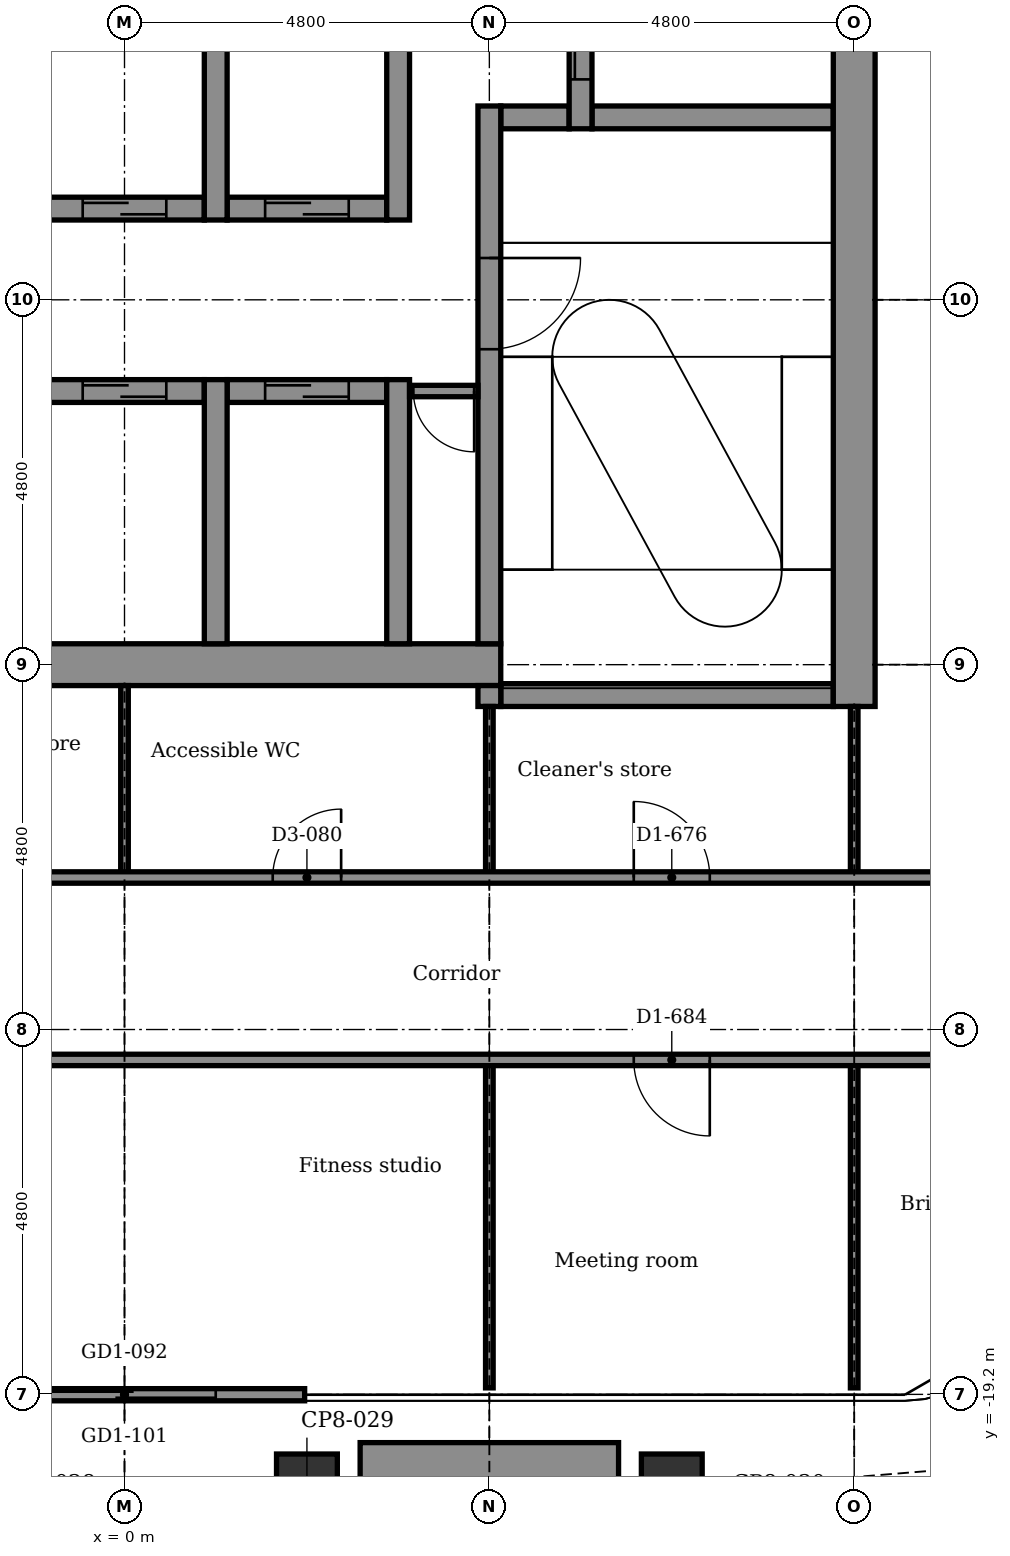
"""IFC4 building model, lengths in metres.
Left out: names, types, materials, properties, quantities, classifications, styles, units other than length and angle.
Written with IfcOpenShell. Run it as: python <this file> out.ifc"""

import sys

from ifc_helpers import new_model, si_unit, direction, frame, frame_2d, origin, origin_2d, place, context, subcontext, project, spatial, rectangle, extrude, element, fill, save


model = new_model("IFC4")
c1 = context("Model", 3, precision=1e-05, world=origin(), true_north=direction((0.0, 1.0)))
c2 = subcontext(c1, "Body", "Model", "MODEL_VIEW")
j1 = project(units=[si_unit("LENGTHUNIT", "METRE"), si_unit("PLANEANGLEUNIT", "RADIAN")], contexts=[c1])
p1 = place(None, origin())
s1 = spatial("IfcSite", under=j1, at=p1, CompositionType="ELEMENT")
p2 = place(p1, origin())
s2 = spatial("IfcBuilding", under=s1, at=p2, CompositionType="ELEMENT")
p3 = place(p2, frame((0.0, 0.0, 242.3)))
s3 = spatial("IfcBuildingStorey", under=s2, at=p3, CompositionType="ELEMENT", Elevation=242.3)
for number, where, z_axis, x_axis in (
    (1, (7.2, -20.385, -0.15), (0.0, 0.0, 1.0), (1.0, 0.0, 0.0)),
    (2, (2.4, -20.385, -0.15), (0.0, 0.0, 1.0), (1.0, 0.0, 0.0)),
):
    element("IfcColumn", number, at=place(p3, frame(where, z_axis=z_axis, x_axis=x_axis)), inside=s3, PredefinedType="COLUMN", context=c2, shape_type="SweptSolid", body=[
        extrude(rectangle(XDim=0.8, YDim=0.8, at=origin_2d()), origin(), (0.0, 0.0, 1.0), 3.9),
    ])
p4 = place(p3, frame((4.95, -10.0, -0.15), z_axis=(0.0, 0.0, 1.0), x_axis=(1.0, 0.0, 0.0)))
e3 = element("IfcWall", 3, at=p4, inside=s3, PredefinedType="STANDARD", context=c2, shape_type="SweptSolid", body=[
    extrude(rectangle(XDim=4.375, YDim=0.3, at=frame_2d((2.188, 0.0))), origin(), (0.0, 0.0, 1.0), 3.9),
])
p5 = place(p3, frame((-5.25, -9.6, -0.15), z_axis=(0.0, 0.0, 1.0), x_axis=(1.0, 0.0, 0.0)))
e4 = element("IfcWall", 4, at=p5, inside=s3, PredefinedType="SHEAR", context=c2, shape_type="SweptSolid", body=[
    extrude(rectangle(XDim=10.2, YDim=0.55, at=frame_2d((5.1, 0.0))), origin(), (0.0, 0.0, 1.0), 3.9),
])
p6 = place(p5, frame((0.6, 0.0, 0.15)))
e5 = element("IfcOpeningElement", 5, at=p6, cuts=e4, PredefinedType="OPENING", context=c2, shape_type="SweptSolid", body=[
    extrude(rectangle(XDim=0.9, YDim=2.1, at=frame_2d((0.45, 1.05))), frame((0.0, 0.285, 0.0), z_axis=(0.0, -1.0, 0.0), x_axis=(1.0, 0.0, 0.0)), (0.0, 0.0, 1.0), 0.57),
])
p7 = place(p3, frame((-1.05, -6.0, -0.15), z_axis=(0.0, 0.0, 1.0), x_axis=(1.0, 0.0, 0.0)))
e6 = element("IfcWall", 6, at=p7, inside=s3, PredefinedType="STANDARD", context=c2, shape_type="SweptSolid", body=[
    extrude(rectangle(XDim=2.1, YDim=0.3, at=frame_2d((1.05, 0.0))), origin(), (0.0, 0.0, 1.0), 3.9),
])
p8 = place(p7, frame((0.5, 0.0, 0.15)))
e7 = element("IfcOpeningElement", 7, at=p8, cuts=e6, PredefinedType="OPENING", context=c2, shape_type="SweptSolid", body=[
    extrude(rectangle(XDim=1.1, YDim=2.1, at=frame_2d((0.55, 1.05))), frame((0.0, 0.16, 0.0), z_axis=(0.0, -1.0, 0.0), x_axis=(1.0, 0.0, 0.0)), (0.0, 0.0, 1.0), 0.32),
])
p9 = place(p3, frame((1.35, -6.0, -0.15), z_axis=(0.0, 0.0, 1.0), x_axis=(1.0, 0.0, 0.0)))
e8 = element("IfcWall", 8, at=p9, inside=s3, PredefinedType="STANDARD", context=c2, shape_type="SweptSolid", body=[
    extrude(rectangle(XDim=2.1, YDim=0.3, at=frame_2d((1.05, 0.0))), origin(), (0.0, 0.0, 1.0), 3.9),
])
p10 = place(p9, frame((0.5, 0.0, 0.15)))
e9 = element("IfcOpeningElement", 9, at=p10, cuts=e8, PredefinedType="OPENING", context=c2, shape_type="SweptSolid", body=[
    extrude(rectangle(XDim=1.1, YDim=2.1, at=frame_2d((0.55, 1.05))), frame((0.0, 0.16, 0.0), z_axis=(0.0, -1.0, 0.0), x_axis=(1.0, 0.0, 0.0)), (0.0, 0.0, 1.0), 0.32),
])
p11 = place(p3, frame((-1.05, -3.6, -0.15), z_axis=(0.0, 0.0, 1.0), x_axis=(1.0, 0.0, 0.0)))
e10 = element("IfcWall", 10, at=p11, inside=s3, PredefinedType="STANDARD", context=c2, shape_type="SweptSolid", body=[
    extrude(rectangle(XDim=2.1, YDim=0.3, at=frame_2d((1.05, 0.0))), origin(), (0.0, 0.0, 1.0), 3.9),
])
p12 = place(p11, frame((0.5, 0.0, 0.15)))
e11 = element("IfcOpeningElement", 11, at=p12, cuts=e10, PredefinedType="OPENING", context=c2, shape_type="SweptSolid", body=[
    extrude(rectangle(XDim=1.1, YDim=2.1, at=frame_2d((0.55, 1.05))), frame((0.0, 0.16, 0.0), z_axis=(0.0, -1.0, 0.0), x_axis=(1.0, 0.0, 0.0)), (0.0, 0.0, 1.0), 0.32),
])
p13 = place(p3, frame((1.35, -3.6, -0.15), z_axis=(0.0, 0.0, 1.0), x_axis=(1.0, 0.0, 0.0)))
e12 = element("IfcWall", 12, at=p13, inside=s3, PredefinedType="STANDARD", context=c2, shape_type="SweptSolid", body=[
    extrude(rectangle(XDim=2.1, YDim=0.3, at=frame_2d((1.05, 0.0))), origin(), (0.0, 0.0, 1.0), 3.9),
])
p14 = place(p13, frame((0.5, 0.0, 0.15)))
e13 = element("IfcOpeningElement", 13, at=p14, cuts=e12, PredefinedType="OPENING", context=c2, shape_type="SweptSolid", body=[
    extrude(rectangle(XDim=1.1, YDim=2.1, at=frame_2d((0.55, 1.05))), frame((0.0, 0.16, 0.0), z_axis=(0.0, -1.0, 0.0), x_axis=(1.0, 0.0, 0.0)), (0.0, 0.0, 1.0), 0.32),
])
p15 = place(p3, frame((4.95, -2.4, -0.15), z_axis=(0.0, 0.0, 1.0), x_axis=(1.0, 0.0, 0.0)))
e14 = element("IfcWall", 14, at=p15, inside=s3, PredefinedType="STANDARD", context=c2, shape_type="SweptSolid", body=[
    extrude(rectangle(XDim=0.9, YDim=0.3, at=frame_2d((0.45, 0.0))), origin(), (0.0, 0.0, 1.0), 3.9),
])
p16 = place(p3, frame((6.15, -2.4, -0.15), z_axis=(0.0, 0.0, 1.0), x_axis=(1.0, 0.0, 0.0)))
e15 = element("IfcWall", 15, at=p16, inside=s3, PredefinedType="STANDARD", context=c2, shape_type="SweptSolid", body=[
    extrude(rectangle(XDim=3.175, YDim=0.3, at=frame_2d((1.587, 0.0))), origin(), (0.0, 0.0, 1.0), 3.9),
])
p17 = place(p3, frame((1.2, -9.325, -0.15), z_axis=(0.0, 0.0, 1.0), x_axis=(0.0, 1.0, 0.0)))
e16 = element("IfcWall", 16, at=p17, inside=s3, PredefinedType="STANDARD", context=c2, shape_type="SweptSolid", body=[
    extrude(rectangle(XDim=3.475, YDim=0.3, at=frame_2d((1.737, 0.0))), origin(), (0.0, 0.0, 1.0), 3.9),
])
p18 = place(p3, frame((1.2, -3.75, -0.15), z_axis=(0.0, 0.0, 1.0), x_axis=(0.0, 1.0, 0.0)))
e17 = element("IfcWall", 17, at=p18, inside=s3, PredefinedType="STANDARD", context=c2, shape_type="SweptSolid", body=[
    extrude(rectangle(XDim=7.5, YDim=0.3, at=frame_2d((3.75, 0.0))), origin(), (0.0, 0.0, 1.0), 3.9),
])
p19 = place(p3, frame((3.6, -9.325, -0.15), z_axis=(0.0, 0.0, 1.0), x_axis=(0.0, 1.0, 0.0)))
e18 = element("IfcWall", 18, at=p19, inside=s3, PredefinedType="STANDARD", context=c2, shape_type="SweptSolid", body=[
    extrude(rectangle(XDim=3.475, YDim=0.3, at=frame_2d((1.737, 0.0))), origin(), (0.0, 0.0, 1.0), 3.9),
])
p20 = place(p3, frame((3.6, -3.75, -0.15), z_axis=(0.0, 0.0, 1.0), x_axis=(0.0, 1.0, 0.0)))
e19 = element("IfcWall", 19, at=p20, inside=s3, PredefinedType="STANDARD", context=c2, shape_type="SweptSolid", body=[
    extrude(rectangle(XDim=7.5, YDim=0.3, at=frame_2d((3.75, 0.0))), origin(), (0.0, 0.0, 1.0), 3.9),
])
p21 = place(p3, frame((4.8, -10.15, -0.15), z_axis=(0.0, 0.0, 1.0), x_axis=(0.0, 1.0, 0.0)))
e20 = element("IfcWall", 20, at=p21, inside=s3, PredefinedType="STANDARD", context=c2, shape_type="SweptSolid", body=[
    extrude(rectangle(XDim=0.275, YDim=0.3, at=frame_2d((0.137, 0.0))), origin(), (0.0, 0.0, 1.0), 3.9),
])
p22 = place(p3, frame((4.8, -9.325, -0.15), z_axis=(0.0, 0.0, 1.0), x_axis=(0.0, 1.0, 0.0)))
e21 = element("IfcWall", 21, at=p22, inside=s3, PredefinedType="STANDARD", context=c2, shape_type="SweptSolid", body=[
    extrude(rectangle(XDim=7.075, YDim=0.3, at=frame_2d((3.538, 0.0))), origin(), (0.0, 0.0, 1.0), 3.9),
])
p23 = place(p22, frame((3.875, 0.0, 0.15)))
e22 = element("IfcOpeningElement", 22, at=p23, cuts=e21, PredefinedType="OPENING", context=c2, shape_type="SweptSolid", body=[
    extrude(rectangle(XDim=1.2, YDim=2.1, at=frame_2d((0.6, 1.05))), frame((0.0, 0.16, 0.0), z_axis=(0.0, -1.0, 0.0), x_axis=(1.0, 0.0, 0.0)), (0.0, 0.0, 1.0), 0.32),
])
p24 = place(p3, frame((6.0, -2.55, -0.15), z_axis=(0.0, 0.0, 1.0), x_axis=(0.0, 1.0, 0.0)))
e23 = element("IfcWall", 23, at=p24, inside=s3, PredefinedType="STANDARD", context=c2, shape_type="SweptSolid", body=[
    extrude(rectangle(XDim=7.5, YDim=0.3, at=frame_2d((3.75, 0.0))), origin(), (0.0, 0.0, 1.0), 3.9),
])
p25 = place(p24, frame((0.65, 0.0, 0.15)))
e24 = element("IfcOpeningElement", 24, at=p25, cuts=e23, PredefinedType="OPENING", context=c2, shape_type="SweptSolid", body=[
    extrude(rectangle(XDim=1.4, YDim=2.1, at=frame_2d((0.7, 1.05))), frame((0.0, 0.16, 0.0), z_axis=(0.0, -1.0, 0.0), x_axis=(1.0, 0.0, 0.0)), (0.0, 0.0, 1.0), 0.32),
])
p26 = place(p24, frame((3.05, 0.0, 0.15)))
e25 = element("IfcOpeningElement", 25, at=p26, cuts=e23, PredefinedType="OPENING", context=c2, shape_type="SweptSolid", body=[
    extrude(rectangle(XDim=1.4, YDim=2.1, at=frame_2d((0.7, 1.05))), frame((0.0, 0.16, 0.0), z_axis=(0.0, -1.0, 0.0), x_axis=(1.0, 0.0, 0.0)), (0.0, 0.0, 1.0), 0.32),
])
p27 = place(p24, frame((5.45, 0.0, 0.15)))
e26 = element("IfcOpeningElement", 26, at=p27, cuts=e23, PredefinedType="OPENING", context=c2, shape_type="SweptSolid", body=[
    extrude(rectangle(XDim=1.4, YDim=2.1, at=frame_2d((0.7, 1.05))), frame((0.0, 0.16, 0.0), z_axis=(0.0, -1.0, 0.0), x_axis=(1.0, 0.0, 0.0)), (0.0, 0.0, 1.0), 0.32),
])
p28 = place(p3, frame((9.6, -10.15, -0.15), z_axis=(0.0, 0.0, 1.0), x_axis=(0.0, 1.0, 0.0)))
e27 = element("IfcWall", 27, at=p28, inside=s3, PredefinedType="SHEAR", context=c2, shape_type="SweptSolid", body=[
    extrude(rectangle(XDim=20.075, YDim=0.55, at=frame_2d((10.038, 0.0))), origin(), (0.0, 0.0, 1.0), 3.9),
])
p29 = place(p3, frame((2.37, -19.205, 0.0), z_axis=(0.0, 0.0, 1.0), x_axis=(-1.0, 0.0, 0.0)))
e28 = element("IfcWall", 28, at=p29, inside=s3, PredefinedType="PARTITIONING", context=c2, shape_type="SweptSolid", body=[
    extrude(rectangle(XDim=4.74, YDim=0.16, at=frame_2d((2.37, 0.0))), origin(), (0.0, 0.0, 1.0), 3.75),
])
p30 = place(p29, frame((1.17, 0.0, 0.0)))
e29 = element("IfcOpeningElement", 29, at=p30, cuts=e28, PredefinedType="OPENING", context=c2, shape_type="SweptSolid", body=[
    extrude(rectangle(XDim=2.4, YDim=2.4, at=frame_2d((1.2, 1.2))), frame((0.0, 0.09, 0.0), z_axis=(0.0, -1.0, 0.0), x_axis=(1.0, 0.0, 0.0)), (0.0, 0.0, 1.0), 0.18),
])
p31 = place(p3, frame((6.5, -20.135, 0.0), z_axis=(0.0, 0.0, 1.0), x_axis=(-1.0, 0.0, 0.0)))
e30 = element("IfcWall", 30, at=p31, inside=s3, PredefinedType="USERDEFINED", context=c2, shape_type="SweptSolid", body=[
    extrude(rectangle(XDim=3.4, YDim=0.6, at=frame_2d((1.7, 0.0))), origin(), (0.0, 0.0, 1.0), 0.7),
])
p32 = place(p3, frame((9.6, -19.115, 0.0), z_axis=(0.0, 0.0, 1.0), x_axis=(0.0, 1.0, 0.0)))
e31 = element("IfcWall", 31, at=p32, inside=s3, PredefinedType="PARTITIONING", context=c2, shape_type="SweptSolid", body=[
    extrude(rectangle(XDim=4.314, YDim=0.1, at=frame_2d((2.157, 0.0))), origin(), (0.0, 0.0, 1.0), 3.293),
])
p33 = place(p3, frame((9.6, -12.4, 0.0), z_axis=(0.0, 0.0, 1.0), x_axis=(0.0, 1.0, 0.0)))
e32 = element("IfcWall", 32, at=p33, inside=s3, PredefinedType="PARTITIONING", context=c2, shape_type="SweptSolid", body=[
    extrude(rectangle(XDim=2.25, YDim=0.1, at=frame_2d((1.125, 0.0))), origin(), (0.0, 0.0, 1.0), 3.293),
])
p34 = place(p3, frame((4.8, -19.115, 0.0), z_axis=(0.0, 0.0, 1.0), x_axis=(0.0, 1.0, 0.0)))
e33 = element("IfcWall", 33, at=p34, inside=s3, PredefinedType="PARTITIONING", context=c2, shape_type="SweptSolid", body=[
    extrude(rectangle(XDim=4.314, YDim=0.1, at=frame_2d((2.157, 0.0))), origin(), (0.0, 0.0, 1.0), 3.293),
])
p35 = place(p3, frame((4.8, -12.4, 0.0), z_axis=(0.0, 0.0, 1.0), x_axis=(0.0, 1.0, 0.0)))
e34 = element("IfcWall", 34, at=p35, inside=s3, PredefinedType="PARTITIONING", context=c2, shape_type="SweptSolid", body=[
    extrude(rectangle(XDim=2.25, YDim=0.1, at=frame_2d((1.125, 0.0))), origin(), (0.0, 0.0, 1.0), 3.293),
])
p36 = place(p3, frame((0.0, -12.4, 0.0), z_axis=(0.0, 0.0, 1.0), x_axis=(0.0, 1.0, 0.0)))
e35 = element("IfcWall", 35, at=p36, inside=s3, PredefinedType="PARTITIONING", context=c2, shape_type="SweptSolid", body=[
    extrude(rectangle(XDim=2.525, YDim=0.1, at=frame_2d((1.262, 0.0))), origin(), (0.0, 0.0, 1.0), 3.217),
])
p37 = place(p3, frame((-13.585, -14.8, 0.0), z_axis=(0.0, 0.0, 1.0), x_axis=(1.0, 0.0, 0.0)))
e36 = element("IfcWall", 36, at=p37, inside=s3, PredefinedType="PARTITIONING", context=c2, shape_type="SweptSolid", body=[
    extrude(rectangle(XDim=27.169, YDim=0.15, at=frame_2d((13.585, 0.0))), origin(), (0.0, 0.0, 1.0), 3.75),
])
p38 = place(p37, frame((6.281, 0.0, 0.0)))
e37 = element("IfcOpeningElement", 37, at=p38, cuts=e36, PredefinedType="OPENING", context=c2, shape_type="SweptSolid", body=[
    extrude(rectangle(XDim=1.0, YDim=2.1, at=frame_2d((0.5, 1.05))), frame((0.0, 0.085, 0.0), z_axis=(0.0, -1.0, 0.0), x_axis=(1.0, 0.0, 0.0)), (0.0, 0.0, 1.0), 0.17),
])
p39 = place(p37, frame((11.16, 0.0, 0.0)))
e38 = element("IfcOpeningElement", 38, at=p39, cuts=e36, PredefinedType="OPENING", context=c2, shape_type="SweptSolid", body=[
    extrude(rectangle(XDim=1.0, YDim=2.1, at=frame_2d((0.5, 1.05))), frame((0.0, 0.085, 0.0), z_axis=(0.0, -1.0, 0.0), x_axis=(1.0, 0.0, 0.0)), (0.0, 0.0, 1.0), 0.17),
])
p40 = place(p37, frame((20.285, 0.0, 0.0)))
e39 = element("IfcOpeningElement", 39, at=p40, cuts=e36, PredefinedType="OPENING", context=c2, shape_type="SweptSolid", body=[
    extrude(rectangle(XDim=1.0, YDim=2.1, at=frame_2d((0.5, 1.05))), frame((0.0, 0.085, 0.0), z_axis=(0.0, -1.0, 0.0), x_axis=(1.0, 0.0, 0.0)), (0.0, 0.0, 1.0), 0.17),
])
p41 = place(p37, frame((24.368, 0.0, 0.0)))
e40 = element("IfcOpeningElement", 40, at=p41, cuts=e36, PredefinedType="OPENING", context=c2, shape_type="SweptSolid", body=[
    extrude(rectangle(XDim=1.0, YDim=2.1, at=frame_2d((0.5, 1.05))), frame((0.0, 0.085, 0.0), z_axis=(0.0, -1.0, 0.0), x_axis=(1.0, 0.0, 0.0)), (0.0, 0.0, 1.0), 0.17),
])
p42 = place(p3, frame((-3.0, -12.4, 0.0), z_axis=(0.0, 0.0, 1.0), x_axis=(1.0, 0.0, 0.0)))
e41 = element("IfcWall", 41, at=p42, inside=s3, PredefinedType="PARTITIONING", context=c2, shape_type="SweptSolid", body=[
    extrude(rectangle(XDim=17.97, YDim=0.15, at=frame_2d((8.985, 0.0))), origin(), (0.0, 0.0, 1.0), 3.75),
])
p43 = place(p42, frame((1.0, 0.0, 0.0)))
e42 = element("IfcOpeningElement", 42, at=p43, cuts=e41, PredefinedType="OPENING", context=c2, shape_type="SweptSolid", body=[
    extrude(rectangle(XDim=1.0, YDim=2.1, at=frame_2d((0.5, 1.05))), frame((0.0, 0.085, 0.0), z_axis=(0.0, -1.0, 0.0), x_axis=(1.0, 0.0, 0.0)), (0.0, 0.0, 1.0), 0.17),
])
p44 = place(p42, frame((4.95, 0.0, 0.0)))
e43 = element("IfcOpeningElement", 43, at=p44, cuts=e41, PredefinedType="OPENING", context=c2, shape_type="SweptSolid", body=[
    extrude(rectangle(XDim=0.9, YDim=2.1, at=frame_2d((0.45, 1.05))), frame((0.0, 0.085, 0.0), z_axis=(0.0, -1.0, 0.0), x_axis=(1.0, 0.0, 0.0)), (0.0, 0.0, 1.0), 0.17),
])
p45 = place(p42, frame((9.7, 0.0, 0.0)))
e44 = element("IfcOpeningElement", 44, at=p45, cuts=e41, PredefinedType="OPENING", context=c2, shape_type="SweptSolid", body=[
    extrude(rectangle(XDim=1.0, YDim=2.1, at=frame_2d((0.5, 1.05))), frame((0.0, 0.085, 0.0), z_axis=(0.0, -1.0, 0.0), x_axis=(1.0, 0.0, 0.0)), (0.0, 0.0, 1.0), 0.17),
])
p46 = place(p3, frame((3.75, -6.0, 0.0), z_axis=(0.0, 0.0, 1.0), x_axis=(1.0, 0.0, 0.0)))
e45 = element("IfcWall", 45, at=p46, inside=s3, PredefinedType="PARTITIONING", context=c2, shape_type="SweptSolid", body=[
    extrude(rectangle(XDim=0.9, YDim=0.15, at=frame_2d((0.45, 0.0))), origin(), (0.0, 0.0, 1.0), 3.75),
])
p47 = place(p46, frame((0.05, 0.0, 0.0)))
e46 = element("IfcOpeningElement", 46, at=p47, cuts=e45, PredefinedType="OPENING", context=c2, shape_type="SweptSolid", body=[
    extrude(rectangle(XDim=0.8, YDim=2.1, at=frame_2d((0.4, 1.05))), frame((0.0, 0.085, 0.0), z_axis=(0.0, -1.0, 0.0), x_axis=(1.0, 0.0, 0.0)), (0.0, 0.0, 1.0), 0.17),
])
p48 = place(p30, origin())
e47 = element("IfcDoor", 47, at=p48, inside=s3, OperationType="DOUBLE_DOOR_SLIDING", PredefinedType="DOOR", context=c2, shape_type="SweptSolid", body=[
    extrude(rectangle(XDim=2.4, YDim=2.4, at=frame_2d((1.2, 1.2))), frame((0.0, 0.025, 0.0), z_axis=(0.0, -1.0, 0.0), x_axis=(1.0, 0.0, 0.0)), (0.0, 0.0, 1.0), 0.05),
])
fill(e29, e47)
p49 = place(p47, frame((0.8, 0.0, 0.0), z_axis=(0.0, 0.0, 1.0), x_axis=(-1.0, 0.0, 0.0)))
e48 = element("IfcDoor", 48, at=p49, inside=s3, OperationType="SINGLE_SWING_RIGHT", PredefinedType="DOOR", context=c2, shape_type="SweptSolid", body=[
    extrude(rectangle(XDim=0.8, YDim=2.1, at=frame_2d((0.4, 1.05))), frame((0.0, 0.025, 0.0), z_axis=(0.0, -1.0, 0.0), x_axis=(1.0, 0.0, 0.0)), (0.0, 0.0, 1.0), 0.05),
])
fill(e46, e48)
p50 = place(p44, origin())
e49 = element("IfcDoor", 49, at=p50, inside=s3, OperationType="SINGLE_SWING_RIGHT", PredefinedType="DOOR", context=c2, shape_type="SweptSolid", body=[
    extrude(rectangle(XDim=0.9, YDim=2.1, at=frame_2d((0.45, 1.05))), frame((0.0, 0.025, 0.0), z_axis=(0.0, -1.0, 0.0), x_axis=(1.0, 0.0, 0.0)), (0.0, 0.0, 1.0), 0.05),
])
fill(e43, e49)
p51 = place(p45, origin())
e50 = element("IfcDoor", 50, at=p51, inside=s3, OperationType="SINGLE_SWING_LEFT", PredefinedType="DOOR", context=c2, shape_type="SweptSolid", body=[
    extrude(rectangle(XDim=1.0, YDim=2.1, at=frame_2d((0.5, 1.05))), frame((0.0, 0.025, 0.0), z_axis=(0.0, -1.0, 0.0), x_axis=(1.0, 0.0, 0.0)), (0.0, 0.0, 1.0), 0.05),
])
fill(e44, e50)
p52 = place(p40, frame((1.0, 0.0, 0.0), z_axis=(0.0, 0.0, 1.0), x_axis=(-1.0, 0.0, 0.0)))
e51 = element("IfcDoor", 51, at=p52, inside=s3, OperationType="SINGLE_SWING_RIGHT", PredefinedType="DOOR", context=c2, shape_type="SweptSolid", body=[
    extrude(rectangle(XDim=1.0, YDim=2.1, at=frame_2d((0.5, 1.05))), frame((0.0, 0.025, 0.0), z_axis=(0.0, -1.0, 0.0), x_axis=(1.0, 0.0, 0.0)), (0.0, 0.0, 1.0), 0.05),
])
fill(e39, e51)
p53 = place(p25, origin())
e52 = element("IfcDoor", 52, at=p53, inside=s3, OperationType="DOUBLE_DOOR_SLIDING", PredefinedType="DOOR", context=c2, shape_type="SweptSolid", body=[
    extrude(rectangle(XDim=1.4, YDim=2.1, at=frame_2d((0.7, 1.05))), frame((0.0, 0.025, 0.0), z_axis=(0.0, -1.0, 0.0), x_axis=(1.0, 0.0, 0.0)), (0.0, 0.0, 1.0), 0.05),
])
fill(e24, e52)
p54 = place(p12, origin())
e53 = element("IfcDoor", 53, at=p54, inside=s3, OperationType="DOUBLE_DOOR_SLIDING", PredefinedType="DOOR", context=c2, shape_type="SweptSolid", body=[
    extrude(rectangle(XDim=1.1, YDim=2.1, at=frame_2d((0.55, 1.05))), frame((0.0, 0.025, 0.0), z_axis=(0.0, -1.0, 0.0), x_axis=(1.0, 0.0, 0.0)), (0.0, 0.0, 1.0), 0.05),
])
fill(e11, e53)
p55 = place(p14, origin())
e54 = element("IfcDoor", 54, at=p55, inside=s3, OperationType="DOUBLE_DOOR_SLIDING", PredefinedType="DOOR", context=c2, shape_type="SweptSolid", body=[
    extrude(rectangle(XDim=1.1, YDim=2.1, at=frame_2d((0.55, 1.05))), frame((0.0, 0.025, 0.0), z_axis=(0.0, -1.0, 0.0), x_axis=(1.0, 0.0, 0.0)), (0.0, 0.0, 1.0), 0.05),
])
fill(e13, e54)
p56 = place(p8, origin())
e55 = element("IfcDoor", 55, at=p56, inside=s3, OperationType="DOUBLE_DOOR_SLIDING", PredefinedType="DOOR", context=c2, shape_type="SweptSolid", body=[
    extrude(rectangle(XDim=1.1, YDim=2.1, at=frame_2d((0.55, 1.05))), frame((0.0, 0.025, 0.0), z_axis=(0.0, -1.0, 0.0), x_axis=(1.0, 0.0, 0.0)), (0.0, 0.0, 1.0), 0.05),
])
fill(e7, e55)
p57 = place(p10, origin())
e56 = element("IfcDoor", 56, at=p57, inside=s3, OperationType="DOUBLE_DOOR_SLIDING", PredefinedType="DOOR", context=c2, shape_type="SweptSolid", body=[
    extrude(rectangle(XDim=1.1, YDim=2.1, at=frame_2d((0.55, 1.05))), frame((0.0, 0.025, 0.0), z_axis=(0.0, -1.0, 0.0), x_axis=(1.0, 0.0, 0.0)), (0.0, 0.0, 1.0), 0.05),
])
fill(e9, e56)
p58 = place(p23, frame((1.2, 0.0, 0.0), z_axis=(0.0, 0.0, 1.0), x_axis=(-1.0, 0.0, 0.0)))
e57 = element("IfcDoor", 57, at=p58, inside=s3, OperationType="SINGLE_SWING_RIGHT", PredefinedType="DOOR", context=c2, shape_type="SweptSolid", body=[
    extrude(rectangle(XDim=1.2, YDim=2.1, at=frame_2d((0.6, 1.05))), frame((0.0, 0.025, 0.0), z_axis=(0.0, -1.0, 0.0), x_axis=(1.0, 0.0, 0.0)), (0.0, 0.0, 1.0), 0.05),
])
fill(e22, e57)
save(model, sys.argv[1])
